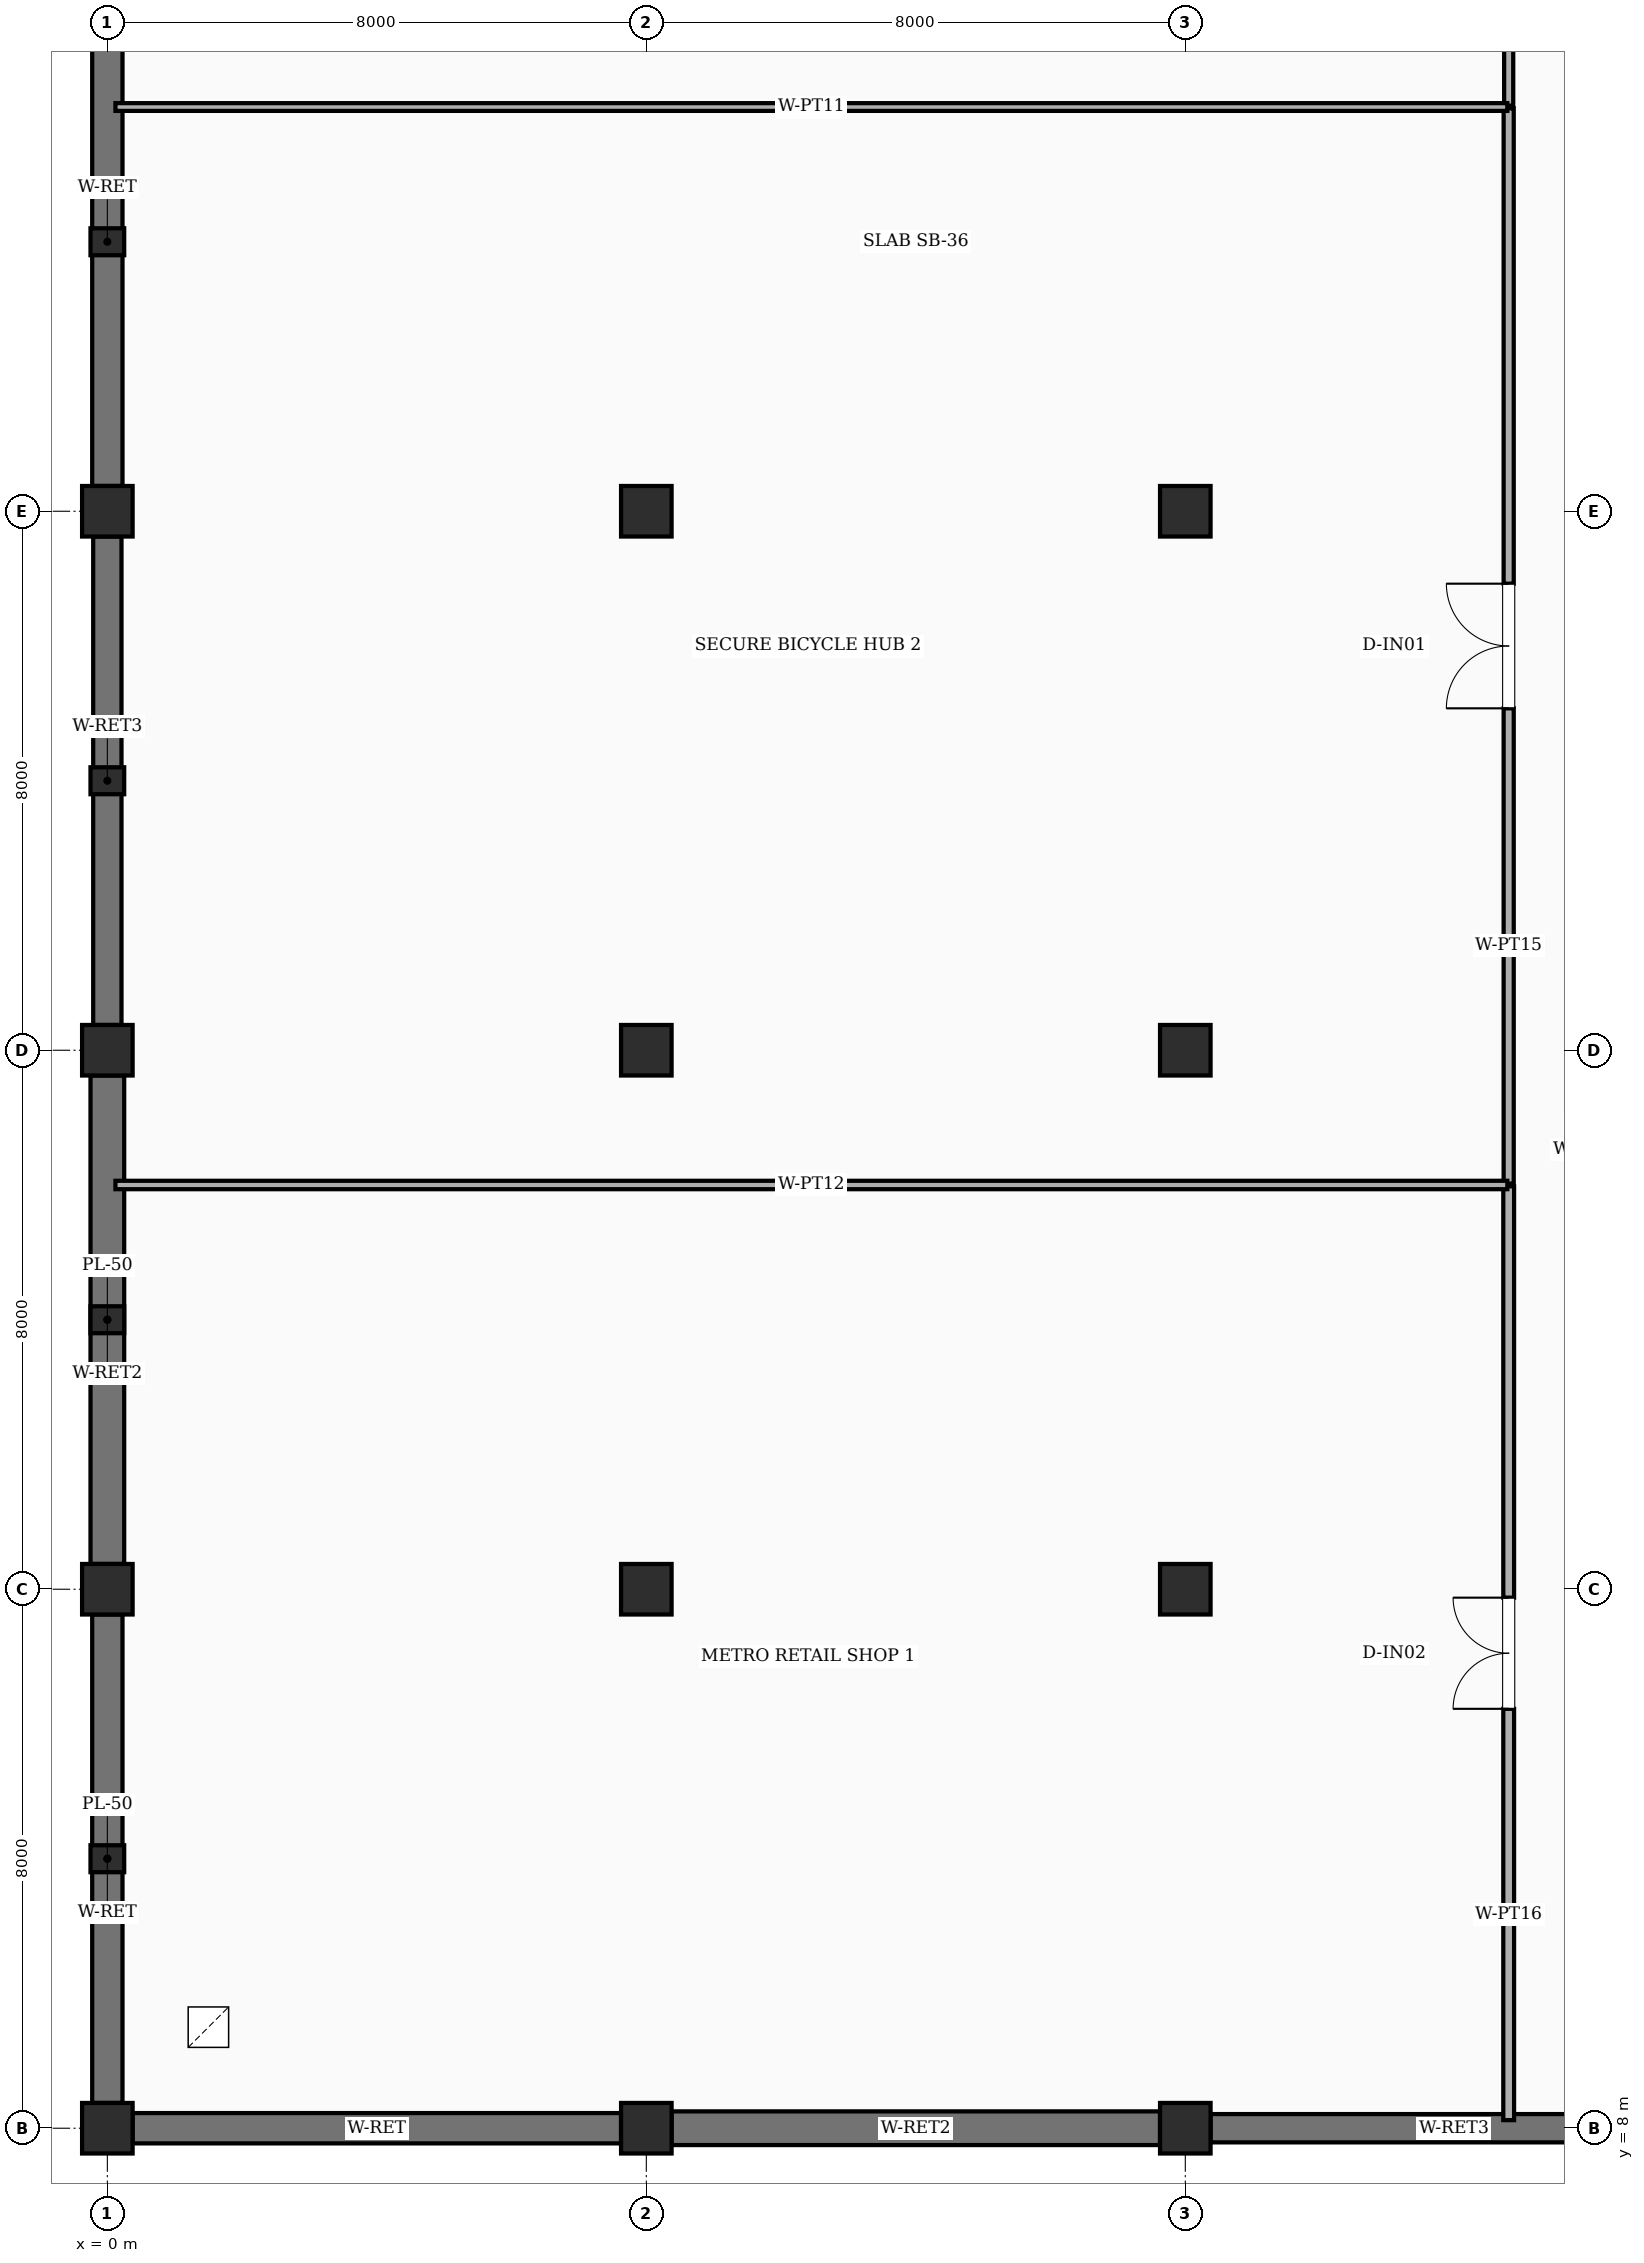
"""IFC4 building model, lengths in metres.
Left out: names, types, materials, properties, quantities, classifications, styles, units other than length and angle.
Written with IfcOpenShell. Run it as: python <this file> out.ifc"""

import sys

from ifc_helpers import new_model, si_unit, direction, frame, frame_2d, origin, origin_2d, place, context, subcontext, project, spatial, rectangle, extrude, element, fill, save


model = new_model("IFC4")
c1 = context("Model", 3, precision=1e-05, world=origin(), true_north=direction((0.0, 1.0)))
c2 = subcontext(c1, "Body", "Model", "MODEL_VIEW")
j1 = project(units=[si_unit("LENGTHUNIT", "METRE"), si_unit("PLANEANGLEUNIT", "RADIAN")], contexts=[c1])
p1 = place(None, origin())
s1 = spatial("IfcSite", under=j1, at=p1, CompositionType="ELEMENT")
p2 = place(p1, origin())
s2 = spatial("IfcBuilding", under=s1, at=p2, CompositionType="ELEMENT")
p3 = place(p2, frame((0.0, 0.0, -5.4)))
s3 = spatial("IfcBuildingStorey", under=s2, at=p3, CompositionType="ELEMENT", Elevation=-5.4)
for number, where, z_axis, x_axis in (
    (1, (0.0, 8.0, -0.4), (0.0, 0.0, 1.0), (1.0, 0.0, 0.0)),
    (2, (0.0, 16.0, -0.4), (0.0, 0.0, 1.0), (1.0, 0.0, 0.0)),
    (3, (0.0, 24.0, -0.4), (0.0, 0.0, 1.0), (1.0, 0.0, 0.0)),
    (4, (0.0, 32.0, -0.4), (0.0, 0.0, 1.0), (1.0, 0.0, 0.0)),
    (5, (8.0, 8.0, -0.4), (0.0, 0.0, 1.0), (1.0, 0.0, 0.0)),
    (6, (8.0, 16.0, -0.4), (0.0, 0.0, 1.0), (1.0, 0.0, 0.0)),
    (7, (8.0, 24.0, -0.4), (0.0, 0.0, 1.0), (1.0, 0.0, 0.0)),
    (8, (8.0, 32.0, -0.4), (0.0, 0.0, 1.0), (1.0, 0.0, 0.0)),
    (9, (16.0, 8.0, -0.4), (0.0, 0.0, 1.0), (1.0, 0.0, 0.0)),
    (10, (16.0, 16.0, -0.4), (0.0, 0.0, 1.0), (1.0, 0.0, 0.0)),
    (11, (16.0, 24.0, -0.4), (0.0, 0.0, 1.0), (1.0, 0.0, 0.0)),
    (12, (16.0, 32.0, -0.4), (0.0, 0.0, 1.0), (1.0, 0.0, 0.0)),
):
    element("IfcColumn", number, at=place(p3, frame(where, z_axis=z_axis, x_axis=x_axis)), inside=s3, PredefinedType="COLUMN", context=c2, shape_type="SweptSolid", body=[
        extrude(rectangle(XDim=0.75, YDim=0.75, at=origin_2d()), origin(), (0.0, 0.0, 1.0), 5.8),
    ])
for number, where, z_axis, x_axis in (
    (13, (0.0, 12.0, -0.4), (0.0, 0.0, 1.0), (1.0, 0.0, 0.0)),
    (14, (0.0, 20.0, -0.4), (0.0, 0.0, 1.0), (1.0, 0.0, 0.0)),
    (15, (0.0, 28.0, -0.4), (0.0, 0.0, 1.0), (1.0, 0.0, 0.0)),
    (16, (0.0, 36.0, -0.4), (0.0, 0.0, 1.0), (1.0, 0.0, 0.0)),
):
    element("IfcColumn", number, at=place(p3, frame(where, z_axis=z_axis, x_axis=x_axis)), inside=s3, PredefinedType="PILASTER", context=c2, shape_type="SweptSolid", body=[
        extrude(rectangle(XDim=0.5, YDim=0.4, at=origin_2d()), origin(), (0.0, 0.0, 1.0), 5.8),
    ])
p4 = place(p3, frame((0.375, 8.0, 0.0), z_axis=(0.0, 0.0, 1.0), x_axis=(1.0, 0.0, 0.0)))
e17 = element("IfcWall", 17, at=p4, inside=s3, PredefinedType="USERDEFINED", context=c2, shape_type="SweptSolid", body=[
    extrude(rectangle(XDim=7.25, YDim=0.45, at=frame_2d((3.625, 0.0))), origin(), (0.0, 0.0, 1.0), 4.4),
])
p5 = place(p3, frame((8.375, 8.0, 0.0), z_axis=(0.0, 0.0, 1.0), x_axis=(1.0, 0.0, 0.0)))
e18 = element("IfcWall", 18, at=p5, inside=s3, PredefinedType="USERDEFINED", context=c2, shape_type="SweptSolid", body=[
    extrude(rectangle(XDim=7.25, YDim=0.5, at=frame_2d((3.625, 0.0))), origin(), (0.0, 0.0, 1.0), 4.4),
])
p6 = place(p3, frame((16.375, 8.0, 0.0), z_axis=(0.0, 0.0, 1.0), x_axis=(1.0, 0.0, 0.0)))
e19 = element("IfcWall", 19, at=p6, inside=s3, PredefinedType="USERDEFINED", context=c2, shape_type="SweptSolid", body=[
    extrude(rectangle(XDim=7.225, YDim=0.42, at=frame_2d((3.613, 0.0))), origin(), (0.0, 0.0, 1.0), 4.4),
])
p7 = place(p3, frame((0.0, 8.375, 0.0), z_axis=(0.0, 0.0, 1.0), x_axis=(0.0, 1.0, 0.0)))
e20 = element("IfcWall", 20, at=p7, inside=s3, PredefinedType="USERDEFINED", context=c2, shape_type="SweptSolid", body=[
    extrude(rectangle(XDim=7.25, YDim=0.45, at=frame_2d((3.625, 0.0))), origin(), (0.0, 0.0, 1.0), 4.4),
])
p8 = place(p3, frame((0.0, 16.375, 0.0), z_axis=(0.0, 0.0, 1.0), x_axis=(0.0, 1.0, 0.0)))
e21 = element("IfcWall", 21, at=p8, inside=s3, PredefinedType="USERDEFINED", context=c2, shape_type="SweptSolid", body=[
    extrude(rectangle(XDim=7.25, YDim=0.5, at=frame_2d((3.625, 0.0))), origin(), (0.0, 0.0, 1.0), 4.4),
])
p9 = place(p3, frame((0.0, 24.375, 0.0), z_axis=(0.0, 0.0, 1.0), x_axis=(0.0, 1.0, 0.0)))
e22 = element("IfcWall", 22, at=p9, inside=s3, PredefinedType="USERDEFINED", context=c2, shape_type="SweptSolid", body=[
    extrude(rectangle(XDim=7.25, YDim=0.42, at=frame_2d((3.625, 0.0))), origin(), (0.0, 0.0, 1.0), 4.4),
])
p10 = place(p3, frame((0.0, 32.375, 0.0), z_axis=(0.0, 0.0, 1.0), x_axis=(0.0, 1.0, 0.0)))
e23 = element("IfcWall", 23, at=p10, inside=s3, PredefinedType="USERDEFINED", context=c2, shape_type="SweptSolid", body=[
    extrude(rectangle(XDim=7.25, YDim=0.45, at=frame_2d((3.625, 0.0))), origin(), (0.0, 0.0, 1.0), 4.4),
])
p11 = place(p3, frame((20.8, 8.12, 0.0), z_axis=(0.0, 0.0, 1.0), x_axis=(0.0, 1.0, 0.0)))
e24 = element("IfcWall", 24, at=p11, inside=s3, PredefinedType="PARTITIONING", context=c2, shape_type="SweptSolid", body=[
    extrude(rectangle(XDim=13.86, YDim=0.16, at=frame_2d((6.93, 0.0))), origin(), (0.0, 0.0, 1.0), 4.15),
])
p12 = place(p11, frame((6.105, 0.0, 0.0)))
e25 = element("IfcOpeningElement", 25, at=p12, cuts=e24, PredefinedType="OPENING", context=c2, shape_type="SweptSolid", body=[
    extrude(rectangle(XDim=1.65, YDim=2.25, at=frame_2d((0.825, 1.125))), frame((0.0, 0.09, 0.0), z_axis=(0.0, -1.0, 0.0), x_axis=(1.0, 0.0, 0.0)), (0.0, 0.0, 1.0), 0.18),
])
p13 = place(p3, frame((20.8, 22.02, 0.0), z_axis=(0.0, 0.0, 1.0), x_axis=(0.0, 1.0, 0.0)))
e26 = element("IfcWall", 26, at=p13, inside=s3, PredefinedType="PARTITIONING", context=c2, shape_type="SweptSolid", body=[
    extrude(rectangle(XDim=15.96, YDim=0.15, at=frame_2d((7.98, 0.0))), origin(), (0.0, 0.0, 1.0), 4.15),
])
p14 = place(p13, frame((7.055, 0.0, 0.0)))
e27 = element("IfcOpeningElement", 27, at=p14, cuts=e26, PredefinedType="OPENING", context=c2, shape_type="SweptSolid", body=[
    extrude(rectangle(XDim=1.85, YDim=2.3, at=frame_2d((0.925, 1.15))), frame((0.0, 0.085, 0.0), z_axis=(0.0, -1.0, 0.0), x_axis=(1.0, 0.0, 0.0)), (0.0, 0.0, 1.0), 0.17),
])
p15 = place(p3, frame((20.8, 38.02, 0.0), z_axis=(0.0, 0.0, 1.0), x_axis=(0.0, 1.0, 0.0)))
e28 = element("IfcWall", 28, at=p15, inside=s3, PredefinedType="PARTITIONING", context=c2, shape_type="SweptSolid", body=[
    extrude(rectangle(XDim=25.86, YDim=0.135, at=frame_2d((12.93, 0.0))), origin(), (0.0, 0.0, 1.0), 4.15),
])
p16 = place(p15, frame((12.005, 0.0, 0.0)))
e29 = element("IfcOpeningElement", 29, at=p16, cuts=e28, PredefinedType="OPENING", context=c2, shape_type="SweptSolid", body=[
    extrude(rectangle(XDim=1.85, YDim=2.3, at=frame_2d((0.925, 1.15))), frame((0.0, 0.077, 0.0), z_axis=(0.0, -1.0, 0.0), x_axis=(1.0, 0.0, 0.0)), (0.0, 0.0, 1.0), 0.155),
])
p17 = place(p3, frame((0.12, 22.0, 0.0), z_axis=(0.0, 0.0, 1.0), x_axis=(1.0, 0.0, 0.0)))
e30 = element("IfcWall", 30, at=p17, inside=s3, PredefinedType="PARTITIONING", context=c2, shape_type="SweptSolid", body=[
    extrude(rectangle(XDim=20.66, YDim=0.125, at=frame_2d((10.33, 0.0))), origin(), (0.0, 0.0, 1.0), 4.15),
])
p18 = place(p3, frame((0.12, 38.0, 0.0), z_axis=(0.0, 0.0, 1.0), x_axis=(1.0, 0.0, 0.0)))
e31 = element("IfcWall", 31, at=p18, inside=s3, PredefinedType="PARTITIONING", context=c2, shape_type="SweptSolid", body=[
    extrude(rectangle(XDim=20.66, YDim=0.115, at=frame_2d((10.33, 0.0))), origin(), (0.0, 0.0, 1.0), 4.15),
])
p19 = place(p12, origin())
e32 = element("IfcDoor", 32, at=p19, inside=s3, OperationType="DOUBLE_DOOR_SINGLE_SWING", PredefinedType="DOOR", context=c2, shape_type="SweptSolid", body=[
    extrude(rectangle(XDim=1.65, YDim=2.25, at=frame_2d((0.825, 1.125))), frame((0.0, 0.025, 0.0), z_axis=(0.0, -1.0, 0.0), x_axis=(1.0, 0.0, 0.0)), (0.0, 0.0, 1.0), 0.05),
])
fill(e25, e32)
p20 = place(p14, origin())
e33 = element("IfcDoor", 33, at=p20, inside=s3, OperationType="DOUBLE_DOOR_SINGLE_SWING", PredefinedType="DOOR", context=c2, shape_type="SweptSolid", body=[
    extrude(rectangle(XDim=1.85, YDim=2.3, at=frame_2d((0.925, 1.15))), frame((0.0, 0.025, 0.0), z_axis=(0.0, -1.0, 0.0), x_axis=(1.0, 0.0, 0.0)), (0.0, 0.0, 1.0), 0.05),
])
fill(e27, e33)
save(model, sys.argv[1])
